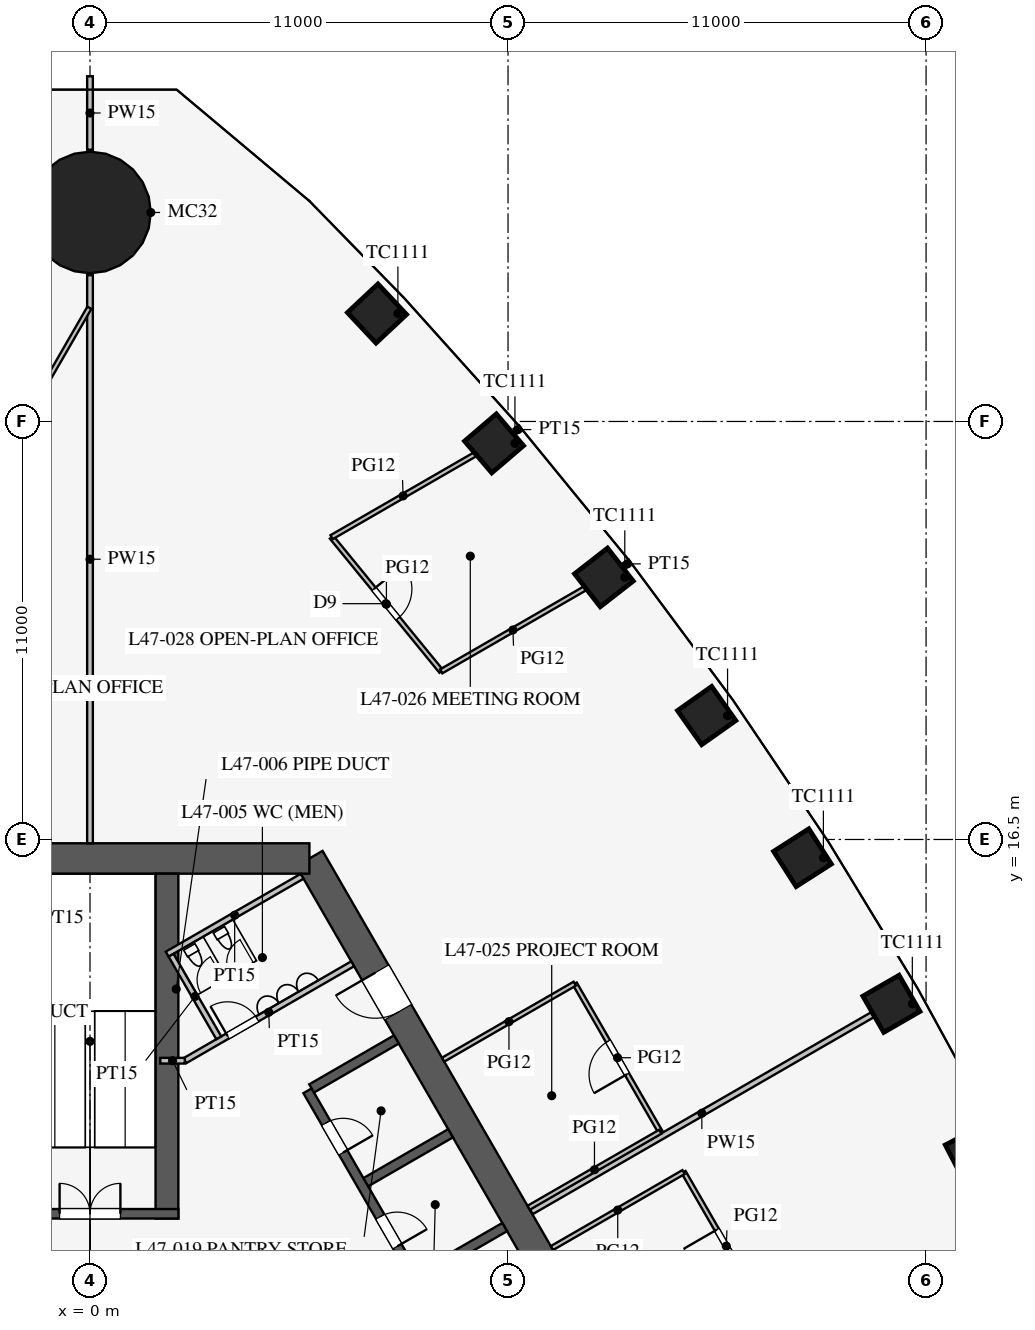
"""IFC4 building model, lengths in metres.
Left out: names, types, materials, properties, quantities, classifications, styles, units other than length and angle.
Written with IfcOpenShell. Run it as: python <this file> out.ifc"""

import sys

from ifc_helpers import new_model, si_unit, direction, frame, frame_2d, origin, origin_2d, place, context, subcontext, project, spatial, rectangle, circle, extrude, element, fill, save


model = new_model("IFC4")
c1 = context("Model", 3, precision=1e-05, world=origin(), true_north=direction((0.0, 1.0)))
c2 = subcontext(c1, "Body", "Model", "MODEL_VIEW")
j1 = project(units=[si_unit("LENGTHUNIT", "METRE"), si_unit("PLANEANGLEUNIT", "RADIAN")], contexts=[c1])
p1 = place(None, origin())
s1 = spatial("IfcSite", under=j1, at=p1, CompositionType="ELEMENT")
p2 = place(p1, origin())
s2 = spatial("IfcBuilding", under=s1, at=p2, CompositionType="ELEMENT")
p3 = place(p2, frame((0.0, 0.0, 206.5)))
s3 = spatial("IfcBuildingStorey", under=s2, at=p3, CompositionType="ELEMENT", Elevation=206.5)
for number, where, z_axis, x_axis in (
    (1, (23.248, 8.226, 0.0), (0.0, 0.0, 1.0), (-0.46, 0.888, 0.0)),
    (2, (21.088, 12.175, 0.0), (0.0, 0.0, 1.0), (-0.5, 0.866, 0.0)),
    (3, (18.748, 16.02, 0.0), (0.0, 0.0, 1.0), (-0.539, 0.842, 0.0)),
    (4, (16.227, 19.761, 0.0), (0.0, 0.0, 1.0), (-0.577, 0.816, 0.0)),
    (5, (13.522, 23.396, 0.0), (0.0, 0.0, 1.0), (-0.615, 0.789, 0.0)),
    (6, (10.632, 26.923, 0.0), (0.0, 0.0, 1.0), (-0.651, 0.759, 0.0)),
    (7, (7.552, 30.341, 0.0), (0.0, 0.0, 1.0), (-0.684, 0.73, 0.0)),
):
    element("IfcColumn", number, at=place(p3, frame(where, z_axis=z_axis, x_axis=x_axis)), inside=s3, PredefinedType="COLUMN", context=c2, shape_type="SweptSolid", body=[
        extrude(rectangle(XDim=1.1, YDim=1.1, at=origin_2d()), origin(), (0.0, 0.0, 1.0), 4.2),
    ])
p4 = place(p3, frame((0.0, 33.0, 0.0), z_axis=(0.0, 0.0, 1.0), x_axis=(1.0, 0.0, 0.0)))
e8 = element("IfcColumn", 8, at=p4, inside=s3, PredefinedType="COLUMN", context=c2, shape_type="SweptSolid", body=[
    extrude(circle(Radius=1.6, at=origin_2d()), origin(), (0.0, 0.0, 1.0), 4.2),
])
p5 = place(p3, frame((16.743, -3.0, 0.0), z_axis=(0.0, 0.0, 1.0), x_axis=(-0.500002442456, 0.866023993627, 0.0)))
e9 = element("IfcWall", 9, at=p5, inside=s3, PredefinedType="SHEAR", context=c2, shape_type="SweptSolid", body=[
    extrude(rectangle(XDim=21.939, YDim=0.8, at=frame_2d((10.97, 0.0))), origin(), (0.0, 0.0, 1.0), 4.2),
])
p6 = place(p5, frame((17.27, 0.0, 0.0)))
e10 = element("IfcOpeningElement", 10, at=p6, cuts=e9, PredefinedType="OPENING", context=c2, shape_type="SweptSolid", body=[
    extrude(rectangle(XDim=1.2, YDim=2.1, at=frame_2d((0.6, 1.05))), frame((0.0, 0.41, 0.0), z_axis=(0.0, -1.0, 0.0), x_axis=(1.0, 0.0, 0.0)), (0.0, 0.0, 1.0), 0.82),
])
p7 = place(p5, frame((3.47, 0.0, 0.0)))
e11 = element("IfcOpeningElement", 11, at=p7, cuts=e9, PredefinedType="OPENING", context=c2, shape_type="SweptSolid", body=[
    extrude(rectangle(XDim=1.2, YDim=2.1, at=frame_2d((0.6, 1.05))), frame((0.0, 0.41, 0.0), z_axis=(0.0, -1.0, 0.0), x_axis=(1.0, 0.0, 0.0)), (0.0, 0.0, 1.0), 0.82),
])
p8 = place(p3, frame((5.773, 16.0, 0.0), z_axis=(0.0, 0.0, 1.0), x_axis=(-1.0, 0.0, 0.0)))
e12 = element("IfcWall", 12, at=p8, inside=s3, PredefinedType="SHEAR", context=c2, shape_type="SweptSolid", body=[
    extrude(rectangle(XDim=11.547, YDim=0.8, at=frame_2d((5.773, 0.0))), origin(), (0.0, 0.0, 1.0), 4.2),
])
p9 = place(p3, frame((11.424, 0.014, 0.0), z_axis=(0.0, 0.0, 1.0), x_axis=(-0.500001763848, 0.866024385424, 0.0)))
e13 = element("IfcWall", 13, at=p9, inside=s3, PredefinedType="SHEAR", context=c2, shape_type="SweptSolid", body=[
    extrude(rectangle(XDim=11.4, YDim=0.25, at=frame_2d((5.7, 0.0))), origin(), (0.0, 0.0, 1.0), 4.2),
])
p10 = place(p9, frame((0.975, 0.0, 0.0)))
e14 = element("IfcOpeningElement", 14, at=p10, cuts=e13, PredefinedType="OPENING", context=c2, shape_type="SweptSolid", body=[
    extrude(rectangle(XDim=0.9, YDim=2.1, at=frame_2d((0.45, 1.05))), frame((0.0, 0.135, 0.0), z_axis=(0.0, -1.0, 0.0), x_axis=(1.0, 0.0, 0.0)), (0.0, 0.0, 1.0), 0.27),
])
p11 = place(p9, frame((3.825, 0.0, 0.0)))
e15 = element("IfcOpeningElement", 15, at=p11, cuts=e13, PredefinedType="OPENING", context=c2, shape_type="SweptSolid", body=[
    extrude(rectangle(XDim=0.9, YDim=2.1, at=frame_2d((0.45, 1.05))), frame((0.0, 0.135, 0.0), z_axis=(0.0, -1.0, 0.0), x_axis=(1.0, 0.0, 0.0)), (0.0, 0.0, 1.0), 0.27),
])
p12 = place(p9, frame((6.675, 0.0, 0.0)))
e16 = element("IfcOpeningElement", 16, at=p12, cuts=e13, PredefinedType="OPENING", context=c2, shape_type="SweptSolid", body=[
    extrude(rectangle(XDim=0.9, YDim=2.1, at=frame_2d((0.45, 1.05))), frame((0.0, 0.135, 0.0), z_axis=(0.0, -1.0, 0.0), x_axis=(1.0, 0.0, 0.0)), (0.0, 0.0, 1.0), 0.27),
])
p13 = place(p9, frame((9.525, 0.0, 0.0)))
e17 = element("IfcOpeningElement", 17, at=p13, cuts=e13, PredefinedType="OPENING", context=c2, shape_type="SweptSolid", body=[
    extrude(rectangle(XDim=0.9, YDim=2.1, at=frame_2d((0.45, 1.05))), frame((0.0, 0.135, 0.0), z_axis=(0.0, -1.0, 0.0), x_axis=(1.0, 0.0, 0.0)), (0.0, 0.0, 1.0), 0.27),
])
for number, where, z_axis, x_axis in (
    (18, (8.682, 5.012, 0.0), (0.0, 0.0, 1.0), (0.866, 0.5, 0.0)),
    (19, (7.257, 7.481, 0.0), (0.0, 0.0, 1.0), (0.866, 0.5, 0.0)),
):
    element("IfcWall", number, at=place(p3, frame(where, z_axis=z_axis, x_axis=x_axis)), inside=s3, PredefinedType="SHEAR", context=c2, shape_type="SweptSolid", body=[
        extrude(rectangle(XDim=2.575, YDim=0.25, at=frame_2d((1.288, 0.0))), origin(), (0.0, 0.0, 1.0), 4.2),
    ])
p14 = place(p3, frame((5.832, 9.949, 0.0), z_axis=(0.0, 0.0, 1.0), x_axis=(0.866029291668, 0.499993265928, 0.0)))
e20 = element("IfcWall", 20, at=p14, inside=s3, PredefinedType="SHEAR", context=c2, shape_type="SweptSolid", body=[
    extrude(rectangle(XDim=2.575, YDim=0.25, at=frame_2d((1.288, 0.0))), origin(), (0.0, 0.0, 1.0), 4.2),
])
p15 = place(p3, frame((2.025, 6.525, 0.0), z_axis=(0.0, 0.0, 1.0), x_axis=(0.0, 1.0, 0.0)))
e21 = element("IfcWall", 21, at=p15, inside=s3, PredefinedType="SHEAR", context=c2, shape_type="SweptSolid", body=[
    extrude(rectangle(XDim=9.075, YDim=0.6, at=frame_2d((4.538, 0.0))), origin(), (0.0, 0.0, 1.0), 4.2),
])
p16 = place(p3, frame((2.325, 6.65, 0.0), z_axis=(0.0, 0.0, 1.0), x_axis=(-1.0, 0.0, 0.0)))
e22 = element("IfcWall", 22, at=p16, inside=s3, PredefinedType="SHEAR", context=c2, shape_type="SweptSolid", body=[
    extrude(rectangle(XDim=4.65, YDim=0.25, at=frame_2d((2.325, 0.0))), origin(), (0.0, 0.0, 1.0), 4.2),
])
p17 = place(p16, frame((1.525, 0.0, 0.0)))
e23 = element("IfcOpeningElement", 23, at=p17, cuts=e22, PredefinedType="OPENING", context=c2, shape_type="SweptSolid", body=[
    extrude(rectangle(XDim=1.6, YDim=2.1, at=frame_2d((0.8, 1.05))), frame((0.0, 0.135, 0.0), z_axis=(0.0, -1.0, 0.0), x_axis=(1.0, 0.0, 0.0)), (0.0, 0.0, 1.0), 0.27),
])
p18 = place(p3, frame((2.495, 10.678, 0.0), z_axis=(0.0, 0.0, 1.0), x_axis=(0.86602216432, 0.500005610874, 0.0)))
e24 = element("IfcWall", 24, at=p18, inside=s3, PredefinedType="PARTITIONING", context=c2, shape_type="SweptSolid", body=[
    extrude(rectangle(XDim=5.1, YDim=0.15, at=frame_2d((2.55, 0.0))), origin(), (0.0, 0.0, 1.0), 4.0),
])
p19 = place(p18, frame((1.3, 0.0, 0.0)))
e25 = element("IfcOpeningElement", 25, at=p19, cuts=e24, PredefinedType="OPENING", context=c2, shape_type="SweptSolid", body=[
    extrude(rectangle(XDim=0.9, YDim=2.1, at=frame_2d((0.45, 1.05))), frame((0.0, 0.085, 0.0), z_axis=(0.0, -1.0, 0.0), x_axis=(1.0, 0.0, 0.0)), (0.0, 0.0, 1.0), 0.17),
])
p20 = place(p3, frame((2.495, 10.678, 0.0), z_axis=(0.0, 0.0, 1.0), x_axis=(-1.0, 0.0, 0.0)))
e26 = element("IfcWall", 26, at=p20, inside=s3, PredefinedType="PARTITIONING", context=c2, shape_type="SweptSolid", body=[
    extrude(rectangle(XDim=0.645, YDim=0.15, at=frame_2d((0.323, 0.0))), origin(), (0.0, 0.0, 1.0), 4.0),
])
p21 = place(p3, frame((2.031, 13.482, 0.0), z_axis=(0.0, 0.0, 1.0), x_axis=(0.866050731258, 0.499956128963, 0.0)))
e27 = element("IfcWall", 27, at=p21, inside=s3, PredefinedType="PARTITIONING", context=c2, shape_type="SweptSolid", body=[
    extrude(rectangle(XDim=4.1, YDim=0.15, at=frame_2d((2.05, 0.0))), origin(), (0.0, 0.0, 1.0), 4.0),
])
p22 = place(p3, frame((3.389, 11.281, 0.0), z_axis=(0.0, 0.0, 1.0), x_axis=(-0.499989096993, 0.866031698547, 0.0)))
e28 = element("IfcWall", 28, at=p22, inside=s3, PredefinedType="PARTITIONING", context=c2, shape_type="SweptSolid", body=[
    extrude(rectangle(XDim=2.51, YDim=0.15, at=frame_2d((1.255, 0.0))), origin(), (0.0, 0.0, 1.0), 4.0),
])
p23 = place(p3, frame((0.0, 16.4, 0.0), z_axis=(0.0, 0.0, 1.0), x_axis=(0.0, 1.0, 0.0)))
e29 = element("IfcWall", 29, at=p23, inside=s3, PredefinedType="PARTITIONING", context=c2, shape_type="SweptSolid", body=[
    extrude(rectangle(XDim=14.95, YDim=0.15, at=frame_2d((7.475, 0.0))), origin(), (0.0, 0.0, 1.0), 2.4),
])
p24 = place(p3, frame((0.0, 34.65, 0.0), z_axis=(0.0, 0.0, 1.0), x_axis=(0.0, 1.0, 0.0)))
e30 = element("IfcWall", 30, at=p24, inside=s3, PredefinedType="PARTITIONING", context=c2, shape_type="SweptSolid", body=[
    extrude(rectangle(XDim=1.935, YDim=0.15, at=frame_2d((0.967, 0.0))), origin(), (0.0, 0.0, 1.0), 2.4),
])
p25 = place(p3, frame((11.613, 6.705, 0.0), z_axis=(0.0, 0.0, 1.0), x_axis=(0.86603333284, 0.499986266222, 0.0)))
e31 = element("IfcWall", 31, at=p25, inside=s3, PredefinedType="PARTITIONING", context=c2, shape_type="SweptSolid", body=[
    extrude(rectangle(XDim=10.361, YDim=0.15, at=frame_2d((5.18, 0.0))), origin(), (0.0, 0.0, 1.0), 3.3),
])
p26 = place(p3, frame((15.006, 8.808, 0.0), z_axis=(0.0, 0.0, 1.0), x_axis=(-0.500013631625, 0.866017533419, 0.0)))
e32 = element("IfcWall", 32, at=p26, inside=s3, PredefinedType="PARTITIONING", context=c2, shape_type="SweptSolid", body=[
    extrude(rectangle(XDim=4.5, YDim=0.12, at=frame_2d((2.25, 0.0))), origin(), (0.0, 0.0, 1.0), 2.9),
])
p27 = place(p26, frame((1.75, 0.0, 0.15)))
e33 = element("IfcOpeningElement", 33, at=p27, cuts=e32, PredefinedType="OPENING", context=c2, shape_type="SweptSolid", body=[
    extrude(rectangle(XDim=1.0, YDim=2.1, at=frame_2d((0.5, 1.05))), frame((0.0, 0.07, 0.0), z_axis=(0.0, -1.0, 0.0), x_axis=(1.0, 0.0, 0.0)), (0.0, 0.0, 1.0), 0.14),
])
p28 = place(p3, frame((17.869, 3.85, 0.0), z_axis=(0.0, 0.0, 1.0), x_axis=(-0.500013631625, 0.866017533419, 0.0)))
e34 = element("IfcWall", 34, at=p28, inside=s3, PredefinedType="PARTITIONING", context=c2, shape_type="SweptSolid", body=[
    extrude(rectangle(XDim=4.5, YDim=0.12, at=frame_2d((2.25, 0.0))), origin(), (0.0, 0.0, 1.0), 2.9),
])
p29 = place(p28, frame((1.75, 0.0, 0.15)))
e35 = element("IfcOpeningElement", 35, at=p29, cuts=e34, PredefinedType="OPENING", context=c2, shape_type="SweptSolid", body=[
    extrude(rectangle(XDim=1.0, YDim=2.1, at=frame_2d((0.5, 1.05))), frame((0.0, 0.07, 0.0), z_axis=(0.0, -1.0, 0.0), x_axis=(1.0, 0.0, 0.0)), (0.0, 0.0, 1.0), 0.14),
])
for number, where, z_axis, x_axis in (
    (36, (11.542, 6.808, 0.0), (0.0, 0.0, 1.0), (0.866, 0.5, 0.0)),
    (37, (9.292, 10.705, 0.0), (0.0, 0.0, 1.0), (0.866, 0.5, 0.0)),
    (38, (12.155, 5.747, 0.0), (0.0, 0.0, 1.0), (0.866, 0.5, 0.0)),
):
    element("IfcWall", number, at=place(p3, frame(where, z_axis=z_axis, x_axis=x_axis)), inside=s3, PredefinedType="PARTITIONING", context=c2, shape_type="SweptSolid", body=[
        extrude(rectangle(XDim=4.0, YDim=0.12, at=frame_2d((2.0, 0.0))), origin(), (0.0, 0.0, 1.0), 2.9),
    ])
p30 = place(p3, frame((14.063, 23.708, 0.0), z_axis=(0.0, 0.0, 1.0), x_axis=(0.865614066289, 0.500711781609, 0.0)))
e39 = element("IfcWall", 39, at=p30, inside=s3, PredefinedType="PARTITIONING", context=c2, shape_type="SweptSolid", body=[
    extrude(rectangle(XDim=0.178, YDim=0.15, at=frame_2d((0.089, 0.0))), origin(), (0.0, 0.0, 1.0), 2.9),
])
p31 = place(p3, frame((11.191, 27.246, 0.0), z_axis=(0.0, 0.0, 1.0), x_axis=(0.865836232376, 0.500327511442, 0.0)))
e40 = element("IfcWall", 40, at=p31, inside=s3, PredefinedType="PARTITIONING", context=c2, shape_type="SweptSolid", body=[
    extrude(rectangle(XDim=0.163, YDim=0.15, at=frame_2d((0.082, 0.0))), origin(), (0.0, 0.0, 1.0), 2.9),
])
p32 = place(p3, frame((9.242, 20.924, 0.0), z_axis=(0.0, 0.0, 1.0), x_axis=(-0.632765292047, 0.774343647989, 0.0)))
e41 = element("IfcWall", 41, at=p32, inside=s3, PredefinedType="PARTITIONING", context=c2, shape_type="SweptSolid", body=[
    extrude(rectangle(XDim=4.559, YDim=0.12, at=frame_2d((2.28, 0.0))), origin(), (0.0, 0.0, 1.0), 2.9),
])
p33 = place(p32, frame((1.8, 0.0, 0.15)))
e42 = element("IfcOpeningElement", 42, at=p33, cuts=e41, PredefinedType="OPENING", context=c2, shape_type="SweptSolid", body=[
    extrude(rectangle(XDim=1.0, YDim=2.1, at=frame_2d((0.5, 1.05))), frame((0.0, 0.07, 0.0), z_axis=(0.0, -1.0, 0.0), x_axis=(1.0, 0.0, 0.0)), (0.0, 0.0, 1.0), 0.14),
])
p34 = place(p3, frame((9.242, 20.924, 0.0), z_axis=(0.0, 0.0, 1.0), x_axis=(0.866010142069, 0.500026433136, 0.0)))
e43 = element("IfcWall", 43, at=p34, inside=s3, PredefinedType="PARTITIONING", context=c2, shape_type="SweptSolid", body=[
    extrude(rectangle(XDim=4.357, YDim=0.12, at=frame_2d((2.178, 0.0))), origin(), (0.0, 0.0, 1.0), 2.9),
])
p35 = place(p3, frame((6.357, 24.455, 0.0), z_axis=(0.0, 0.0, 1.0), x_axis=(0.866025625133, 0.499999616612, 0.0)))
e44 = element("IfcWall", 44, at=p35, inside=s3, PredefinedType="PARTITIONING", context=c2, shape_type="SweptSolid", body=[
    extrude(rectangle(XDim=4.346, YDim=0.12, at=frame_2d((2.173, 0.0))), origin(), (0.0, 0.0, 1.0), 2.9),
])
p36 = place(p3, frame((-0.016, 30.491, 0.0), z_axis=(0.0, 0.0, 1.0), x_axis=(-0.50000091641, -0.866024874695, 0.0)))
e45 = element("IfcWall", 45, at=p36, inside=s3, PredefinedType="PARTITIONING", context=c2, shape_type="SweptSolid", body=[
    extrude(rectangle(XDim=52.796, YDim=0.12, at=frame_2d((26.398, 0.0))), origin(), (0.0, 0.0, 1.0), 2.9),
])
p37 = place(p36, frame((10.2, 0.0, 0.15)))
e46 = element("IfcOpeningElement", 46, at=p37, cuts=e45, PredefinedType="OPENING", context=c2, shape_type="SweptSolid", body=[
    extrude(rectangle(XDim=1.8, YDim=2.1, at=frame_2d((0.9, 1.05))), frame((0.0, 0.07, 0.0), z_axis=(0.0, -1.0, 0.0), x_axis=(1.0, 0.0, 0.0)), (0.0, 0.0, 1.0), 0.14),
])
p38 = place(p36, frame((40.8, 0.0, 0.15)))
e47 = element("IfcOpeningElement", 47, at=p38, cuts=e45, PredefinedType="OPENING", context=c2, shape_type="SweptSolid", body=[
    extrude(rectangle(XDim=1.8, YDim=2.1, at=frame_2d((0.9, 1.05))), frame((0.0, 0.07, 0.0), z_axis=(0.0, -1.0, 0.0), x_axis=(1.0, 0.0, 0.0)), (0.0, 0.0, 1.0), 0.14),
])
p39 = place(p19, origin())
e48 = element("IfcDoor", 48, at=p39, inside=s3, OperationType="SINGLE_SWING_LEFT", PredefinedType="DOOR", context=c2, shape_type="SweptSolid", body=[
    extrude(rectangle(XDim=0.9, YDim=2.1, at=frame_2d((0.45, 1.05))), frame((0.0, 0.025, 0.0), z_axis=(0.0, -1.0, 0.0), x_axis=(1.0, 0.0, 0.0)), (0.0, 0.0, 1.0), 0.05),
])
fill(e25, e48)
p40 = place(p17, frame((1.6, 0.0, 0.0), z_axis=(0.0, 0.0, 1.0), x_axis=(-1.0, 0.0, 0.0)))
e49 = element("IfcDoor", 49, at=p40, inside=s3, OperationType="DOUBLE_DOOR_SINGLE_SWING", PredefinedType="DOOR", context=c2, shape_type="SweptSolid", body=[
    extrude(rectangle(XDim=1.6, YDim=2.1, at=frame_2d((0.8, 1.05))), frame((0.0, 0.025, 0.0), z_axis=(0.0, -1.0, 0.0), x_axis=(1.0, 0.0, 0.0)), (0.0, 0.0, 1.0), 0.05),
])
fill(e23, e49)
p41 = place(p6, origin())
e50 = element("IfcDoor", 50, at=p41, inside=s3, OperationType="SINGLE_SWING_RIGHT", PredefinedType="DOOR", context=c2, shape_type="SweptSolid", body=[
    extrude(rectangle(XDim=1.2, YDim=2.1, at=frame_2d((0.6, 1.05))), frame((0.0, 0.025, 0.0), z_axis=(0.0, -1.0, 0.0), x_axis=(1.0, 0.0, 0.0)), (0.0, 0.0, 1.0), 0.05),
])
fill(e10, e50)
p42 = place(p12, frame((0.9, 0.0, 0.0), z_axis=(0.0, 0.0, 1.0), x_axis=(-1.0, 0.0, 0.0)))
e51 = element("IfcDoor", 51, at=p42, inside=s3, OperationType="SINGLE_SWING_RIGHT", PredefinedType="DOOR", context=c2, shape_type="SweptSolid", body=[
    extrude(rectangle(XDim=0.9, YDim=2.1, at=frame_2d((0.45, 1.05))), frame((0.0, 0.025, 0.0), z_axis=(0.0, -1.0, 0.0), x_axis=(1.0, 0.0, 0.0)), (0.0, 0.0, 1.0), 0.05),
])
fill(e16, e51)
p43 = place(p13, frame((0.9, 0.0, 0.0), z_axis=(0.0, 0.0, 1.0), x_axis=(-1.0, 0.0, 0.0)))
e52 = element("IfcDoor", 52, at=p43, inside=s3, OperationType="SINGLE_SWING_RIGHT", PredefinedType="DOOR", context=c2, shape_type="SweptSolid", body=[
    extrude(rectangle(XDim=0.9, YDim=2.1, at=frame_2d((0.45, 1.05))), frame((0.0, 0.025, 0.0), z_axis=(0.0, -1.0, 0.0), x_axis=(1.0, 0.0, 0.0)), (0.0, 0.0, 1.0), 0.05),
])
fill(e17, e52)
p44 = place(p29, origin())
e53 = element("IfcDoor", 53, at=p44, inside=s3, OperationType="SINGLE_SWING_RIGHT", PredefinedType="DOOR", context=c2, shape_type="SweptSolid", body=[
    extrude(rectangle(XDim=1.0, YDim=2.1, at=frame_2d((0.5, 1.05))), frame((0.0, 0.025, 0.0), z_axis=(0.0, -1.0, 0.0), x_axis=(1.0, 0.0, 0.0)), (0.0, 0.0, 1.0), 0.05),
])
fill(e35, e53)
p45 = place(p27, origin())
e54 = element("IfcDoor", 54, at=p45, inside=s3, OperationType="SINGLE_SWING_LEFT", PredefinedType="DOOR", context=c2, shape_type="SweptSolid", body=[
    extrude(rectangle(XDim=1.0, YDim=2.1, at=frame_2d((0.5, 1.05))), frame((0.0, 0.025, 0.0), z_axis=(0.0, -1.0, 0.0), x_axis=(1.0, 0.0, 0.0)), (0.0, 0.0, 1.0), 0.05),
])
fill(e33, e54)
p46 = place(p33, frame((1.0, 0.0, 0.0), z_axis=(0.0, 0.0, 1.0), x_axis=(-1.0, 0.0, 0.0)))
e55 = element("IfcDoor", 55, at=p46, inside=s3, OperationType="SINGLE_SWING_LEFT", PredefinedType="DOOR", context=c2, shape_type="SweptSolid", body=[
    extrude(rectangle(XDim=1.0, YDim=2.1, at=frame_2d((0.5, 1.05))), frame((0.0, 0.025, 0.0), z_axis=(0.0, -1.0, 0.0), x_axis=(1.0, 0.0, 0.0)), (0.0, 0.0, 1.0), 0.05),
])
fill(e42, e55)
save(model, sys.argv[1])
